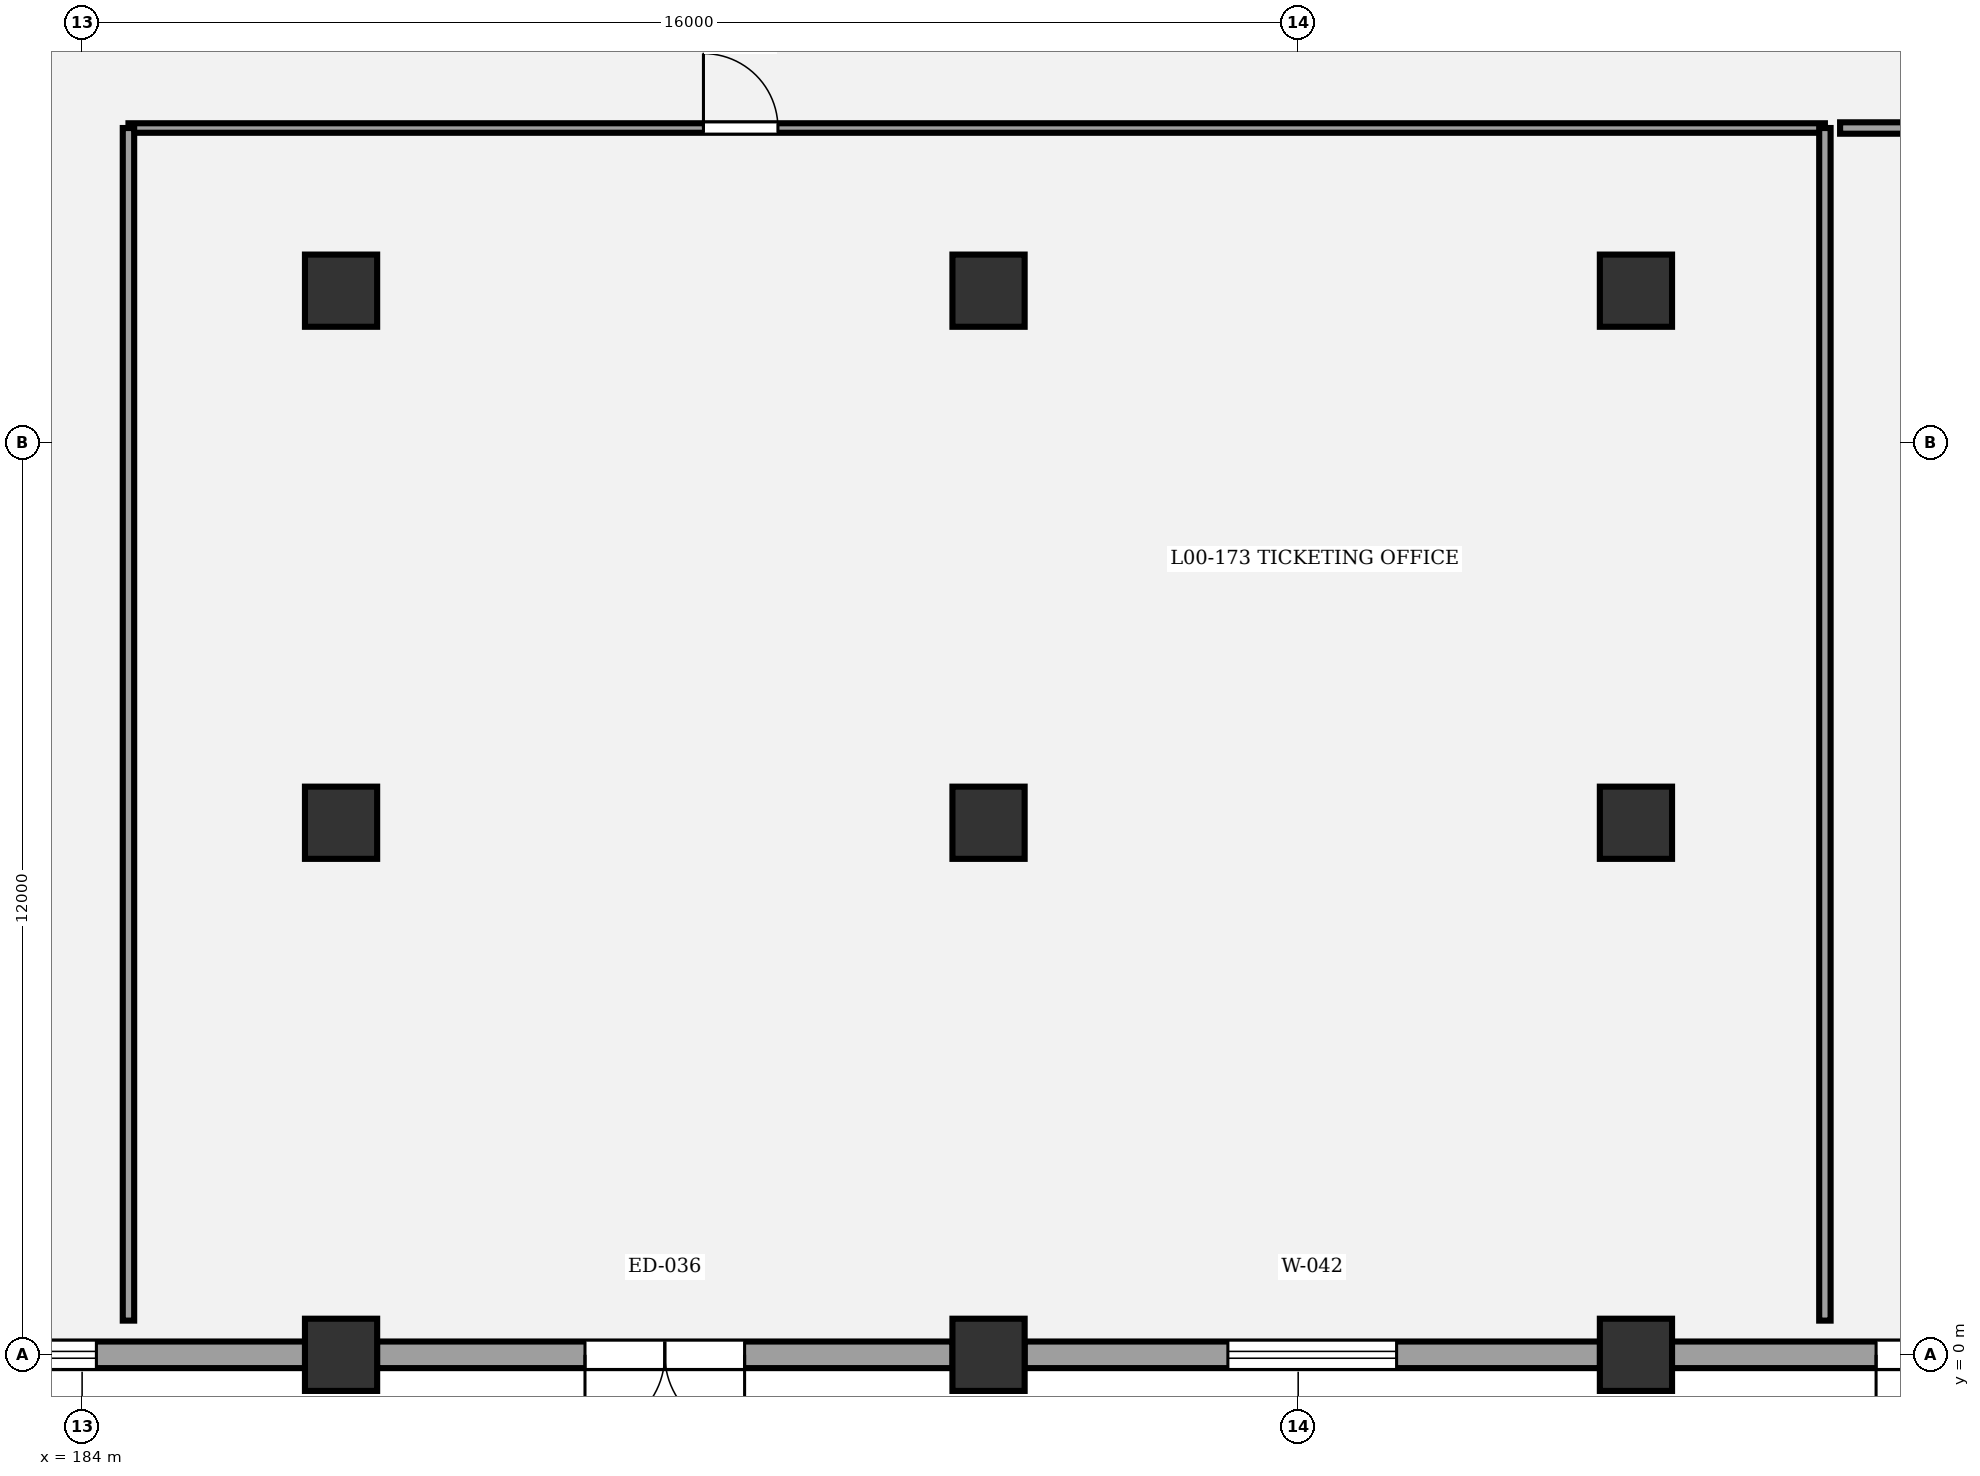
"""IFC4 building model, lengths in metres.
Left out: names, types, materials, properties, quantities, classifications, styles, units other than length and angle.
Written with IfcOpenShell. Run it as: python <this file> out.ifc"""

import sys

from ifc_helpers import new_model, si_unit, direction, frame, frame_2d, origin, origin_2d, place, context, subcontext, project, spatial, rectangle, circle, extrude, element, fill, save


model = new_model("IFC4")
c1 = context("Model", 3, precision=1e-05, world=origin(), true_north=direction((0.0, 1.0)))
c2 = subcontext(c1, "Body", "Model", "MODEL_VIEW")
j1 = project(units=[si_unit("LENGTHUNIT", "METRE"), si_unit("PLANEANGLEUNIT", "RADIAN")], contexts=[c1])
p1 = place(None, origin())
s1 = spatial("IfcSite", under=j1, at=p1, CompositionType="ELEMENT")
p2 = place(p1, origin())
s2 = spatial("IfcBuilding", under=s1, at=p2, CompositionType="ELEMENT")
p3 = place(p2, origin())
s3 = spatial("IfcBuildingStorey", under=s2, at=p3, CompositionType="ELEMENT", Elevation=0.0)
for number, where, z_axis, x_axis in (
    (1, (187.407, 0.0, 0.0), (0.0, 0.0, 1.0), (1.0, 0.0, 0.0)),
    (2, (187.407, 7.0, 0.0), (0.0, 0.0, 1.0), (1.0, 0.0, 0.0)),
    (3, (187.407, 14.0, 0.0), (0.0, 0.0, 1.0), (1.0, 0.0, 0.0)),
    (4, (195.926, 0.0, 0.0), (0.0, 0.0, 1.0), (1.0, 0.0, 0.0)),
    (5, (195.926, 7.0, 0.0), (0.0, 0.0, 1.0), (1.0, 0.0, 0.0)),
    (6, (195.926, 14.0, 0.0), (0.0, 0.0, 1.0), (1.0, 0.0, 0.0)),
    (7, (204.444, 0.0, 0.0), (0.0, 0.0, 1.0), (1.0, 0.0, 0.0)),
    (8, (204.444, 7.0, 0.0), (0.0, 0.0, 1.0), (1.0, 0.0, 0.0)),
    (9, (204.444, 14.0, 0.0), (0.0, 0.0, 1.0), (1.0, 0.0, 0.0)),
):
    element("IfcColumn", number, at=place(p3, frame(where, z_axis=z_axis, x_axis=x_axis)), inside=s3, PredefinedType="COLUMN", context=c2, shape_type="SweptSolid", body=[
        extrude(circle(Radius=0.475, at=origin_2d()), origin(), (0.0, 0.0, 1.0), 5.4),
    ])
p4 = place(p3, frame((186.934, 0.0, 0.0), z_axis=(0.0, 0.0, 1.0), x_axis=(-1.0, 0.0, 0.0)))
e10 = element("IfcWall", 10, at=p4, inside=s3, PredefinedType="STANDARD", context=c2, shape_type="SweptSolid", body=[
    extrude(rectangle(XDim=7.572, YDim=0.35, at=frame_2d((3.786, 0.0))), origin(), (0.0, 0.0, 1.0), 4.16),
])
p5 = place(p4, frame((2.746, 0.0, 0.9)))
e11 = element("IfcOpeningElement", 11, at=p5, cuts=e10, PredefinedType="OPENING", context=c2, shape_type="SweptSolid", body=[
    extrude(rectangle(XDim=2.08, YDim=2.15, at=frame_2d((1.04, 1.075))), frame((0.0, 0.185, 0.0), z_axis=(0.0, -1.0, 0.0), x_axis=(1.0, 0.0, 0.0)), (0.0, 0.0, 1.0), 0.37),
])
p6 = place(p3, frame((195.453, 0.0, 0.0), z_axis=(0.0, 0.0, 1.0), x_axis=(-1.0, 0.0, 0.0)))
e12 = element("IfcWall", 12, at=p6, inside=s3, PredefinedType="STANDARD", context=c2, shape_type="SweptSolid", body=[
    extrude(rectangle(XDim=7.573, YDim=0.35, at=frame_2d((3.787, 0.0))), origin(), (0.0, 0.0, 1.0), 4.16),
])
p7 = place(p6, frame((2.737, 0.0, 0.0)))
e13 = element("IfcOpeningElement", 13, at=p7, cuts=e12, PredefinedType="OPENING", context=c2, shape_type="SweptSolid", body=[
    extrude(rectangle(XDim=2.1, YDim=2.45, at=frame_2d((1.05, 1.225))), frame((0.0, 0.185, 0.0), z_axis=(0.0, -1.0, 0.0), x_axis=(1.0, 0.0, 0.0)), (0.0, 0.0, 1.0), 0.37),
])
p8 = place(p3, frame((203.971, 0.0, 0.0), z_axis=(0.0, 0.0, 1.0), x_axis=(-1.0, 0.0, 0.0)))
e14 = element("IfcWall", 14, at=p8, inside=s3, PredefinedType="STANDARD", context=c2, shape_type="SweptSolid", body=[
    extrude(rectangle(XDim=7.572, YDim=0.35, at=frame_2d((3.786, 0.0))), origin(), (0.0, 0.0, 1.0), 4.16),
])
p9 = place(p8, frame((2.676, 0.0, 0.9)))
e15 = element("IfcOpeningElement", 15, at=p9, cuts=e14, PredefinedType="OPENING", context=c2, shape_type="SweptSolid", body=[
    extrude(rectangle(XDim=2.22, YDim=2.15, at=frame_2d((1.11, 1.075))), frame((0.0, 0.185, 0.0), z_axis=(0.0, -1.0, 0.0), x_axis=(1.0, 0.0, 0.0)), (0.0, 0.0, 1.0), 0.37),
])
p10 = place(p3, frame((212.49, 0.0, 0.0), z_axis=(0.0, 0.0, 1.0), x_axis=(-1.0, 0.0, 0.0)))
e16 = element("IfcWall", 16, at=p10, inside=s3, PredefinedType="STANDARD", context=c2, shape_type="SweptSolid", body=[
    extrude(rectangle(XDim=7.573, YDim=0.35, at=frame_2d((3.787, 0.0))), origin(), (0.0, 0.0, 1.0), 4.16),
])
p11 = place(p10, frame((2.687, 0.0, 0.0)))
e17 = element("IfcOpeningElement", 17, at=p11, cuts=e16, PredefinedType="OPENING", context=c2, shape_type="SweptSolid", body=[
    extrude(rectangle(XDim=2.2, YDim=2.5, at=frame_2d((1.1, 1.25))), frame((0.0, 0.185, 0.0), z_axis=(0.0, -1.0, 0.0), x_axis=(1.0, 0.0, 0.0)), (0.0, 0.0, 1.0), 0.37),
])
p12 = place(p3, frame((184.61, 16.14, 0.0), z_axis=(0.0, 0.0, 1.0), x_axis=(1.0, 0.0, 0.0)))
e18 = element("IfcWall", 18, at=p12, inside=s3, PredefinedType="PARTITIONING", context=c2, shape_type="SweptSolid", body=[
    extrude(rectangle(XDim=22.32, YDim=0.125, at=frame_2d((11.16, 0.0))), origin(), (0.0, 0.0, 1.0), 4.15),
])
p13 = place(p12, frame((7.565, 0.0, 0.0)))
e19 = element("IfcOpeningElement", 19, at=p13, cuts=e18, PredefinedType="OPENING", context=c2, shape_type="SweptSolid", body=[
    extrude(rectangle(XDim=0.98, YDim=2.2, at=frame_2d((0.49, 1.1))), frame((0.0, 0.073, 0.0), z_axis=(0.0, -1.0, 0.0), x_axis=(1.0, 0.0, 0.0)), (0.0, 0.0, 1.0), 0.145),
])
for number, where, z_axis, x_axis in (
    (20, (184.61, 0.45, 0.0), (0.0, 0.0, 1.0), (0.0, 1.0, 0.0)),
    (21, (206.93, 16.14, 0.0), (0.0, 0.0, 1.0), (0.0, -1.0, 0.0)),
):
    element("IfcWall", number, at=place(p3, frame(where, z_axis=z_axis, x_axis=x_axis)), inside=s3, PredefinedType="PARTITIONING", context=c2, shape_type="SweptSolid", body=[
        extrude(rectangle(XDim=15.69, YDim=0.15, at=frame_2d((7.845, 0.0))), origin(), (0.0, 0.0, 1.0), 4.15),
    ])
p14 = place(p3, frame((207.13, 16.14, 0.0), z_axis=(0.0, 0.0, 1.0), x_axis=(1.0, 0.0, 0.0)))
e22 = element("IfcWall", 22, at=p14, inside=s3, PredefinedType="PARTITIONING", context=c2, shape_type="SweptSolid", body=[
    extrude(rectangle(XDim=9.37, YDim=0.15, at=frame_2d((4.685, 0.0))), origin(), (0.0, 0.0, 1.0), 4.15),
])
p15 = place(p5, origin())
e23 = element("IfcWindow", 23, at=p15, inside=s3, PartitioningType="SINGLE_PANEL", PredefinedType="WINDOW", context=c2, shape_type="SweptSolid", body=[
    extrude(rectangle(XDim=2.08, YDim=2.15, at=frame_2d((1.04, 1.075))), frame((0.0, 0.03, 0.0), z_axis=(0.0, -1.0, 0.0), x_axis=(1.0, 0.0, 0.0)), (0.0, 0.0, 1.0), 0.06),
])
fill(e11, e23)
p16 = place(p7, origin())
e24 = element("IfcDoor", 24, at=p16, inside=s3, OperationType="DOUBLE_DOOR_SINGLE_SWING", PredefinedType="DOOR", context=c2, shape_type="SweptSolid", body=[
    extrude(rectangle(XDim=2.1, YDim=2.45, at=frame_2d((1.05, 1.225))), frame((0.0, 0.025, 0.0), z_axis=(0.0, -1.0, 0.0), x_axis=(1.0, 0.0, 0.0)), (0.0, 0.0, 1.0), 0.05),
])
fill(e13, e24)
p17 = place(p9, origin())
e25 = element("IfcWindow", 25, at=p17, inside=s3, PartitioningType="SINGLE_PANEL", PredefinedType="WINDOW", context=c2, shape_type="SweptSolid", body=[
    extrude(rectangle(XDim=2.22, YDim=2.15, at=frame_2d((1.11, 1.075))), frame((0.0, 0.03, 0.0), z_axis=(0.0, -1.0, 0.0), x_axis=(1.0, 0.0, 0.0)), (0.0, 0.0, 1.0), 0.06),
])
fill(e15, e25)
p18 = place(p11, origin())
e26 = element("IfcDoor", 26, at=p18, inside=s3, OperationType="DOUBLE_DOOR_SINGLE_SWING", PredefinedType="DOOR", context=c2, shape_type="SweptSolid", body=[
    extrude(rectangle(XDim=2.2, YDim=2.5, at=frame_2d((1.1, 1.25))), frame((0.0, 0.025, 0.0), z_axis=(0.0, -1.0, 0.0), x_axis=(1.0, 0.0, 0.0)), (0.0, 0.0, 1.0), 0.05),
])
fill(e17, e26)
p19 = place(p13, origin())
e27 = element("IfcDoor", 27, at=p19, inside=s3, OperationType="SINGLE_SWING_LEFT", PredefinedType="DOOR", context=c2, shape_type="SweptSolid", body=[
    extrude(rectangle(XDim=0.98, YDim=2.2, at=frame_2d((0.49, 1.1))), frame((0.0, 0.025, 0.0), z_axis=(0.0, -1.0, 0.0), x_axis=(1.0, 0.0, 0.0)), (0.0, 0.0, 1.0), 0.05),
])
fill(e19, e27)
save(model, sys.argv[1])
